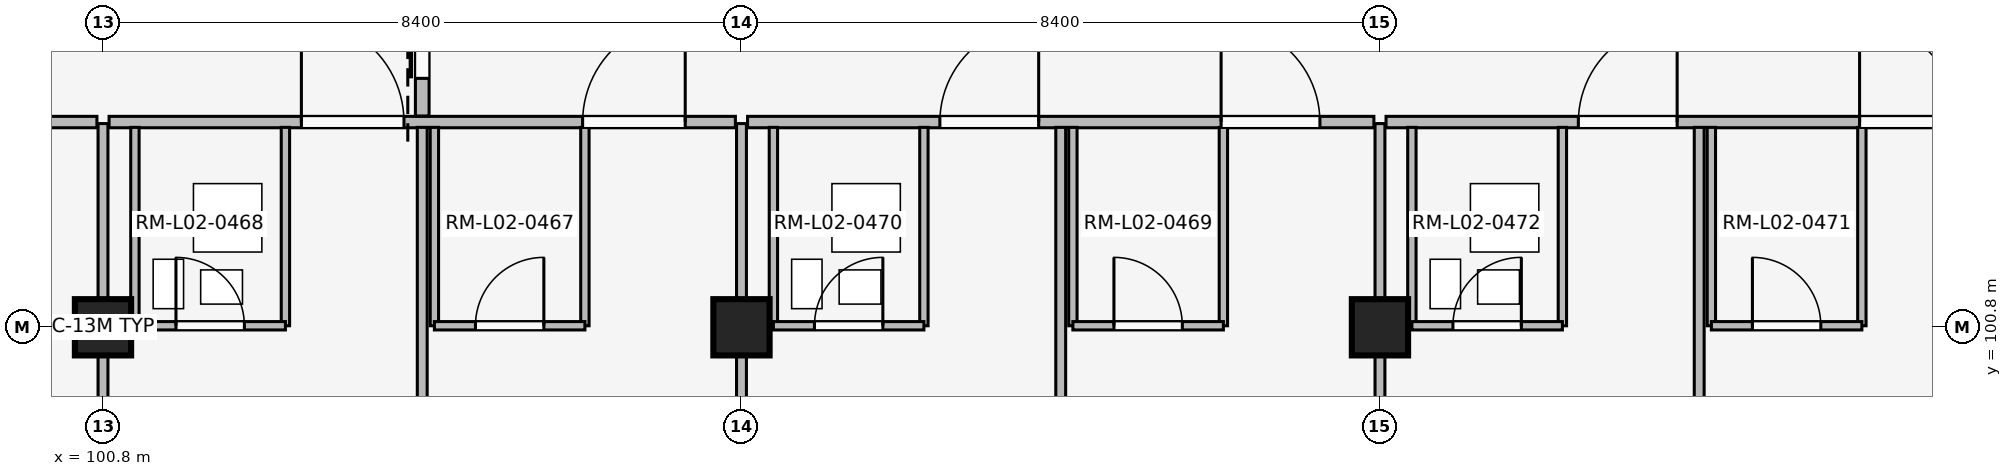
"""IFC4 building model, lengths in metres.
Left out: names, types, materials, properties, quantities, classifications, styles, units other than length and angle.
Written with IfcOpenShell. Run it as: python <this file> out.ifc"""

import sys

from ifc_helpers import new_model, si_unit, direction, frame, frame_2d, origin, origin_2d, place, context, subcontext, project, spatial, rectangle, extrude, element, fill, save


model = new_model("IFC4")
c1 = context("Model", 3, precision=1e-05, world=origin(), true_north=direction((0.0, 1.0)))
c2 = subcontext(c1, "Body", "Model", "MODEL_VIEW")
j1 = project(units=[si_unit("LENGTHUNIT", "METRE"), si_unit("PLANEANGLEUNIT", "RADIAN")], contexts=[c1])
p1 = place(None, origin())
s1 = spatial("IfcSite", under=j1, at=p1, CompositionType="ELEMENT")
p2 = place(p1, origin())
s2 = spatial("IfcBuilding", under=s1, at=p2, CompositionType="ELEMENT")
p3 = place(p2, frame((0.0, 0.0, 8.1)))
s3 = spatial("IfcBuildingStorey", under=s2, at=p3, CompositionType="ELEMENT", Elevation=8.1)
for number, where, z_axis, x_axis in (
    (1, (100.8, 100.8, 0.0), (0.0, 0.0, 1.0), (1.0, 0.0, 0.0)),
    (2, (109.2, 100.8, 0.0), (0.0, 0.0, 1.0), (1.0, 0.0, 0.0)),
    (3, (117.6, 100.8, 0.0), (0.0, 0.0, 1.0), (1.0, 0.0, 0.0)),
):
    element("IfcColumn", number, at=place(p3, frame(where, z_axis=z_axis, x_axis=x_axis)), inside=s3, PredefinedType="COLUMN", context=c2, shape_type="SweptSolid", body=[
        extrude(rectangle(XDim=0.74, YDim=0.74, at=origin_2d()), origin(), (0.0, 0.0, 1.0), 4.8),
    ])
p4 = place(p3, frame((92.76, 103.5, 0.0), z_axis=(0.0, 0.0, 1.0), x_axis=(1.0, 0.0, 0.0)))
e4 = element("IfcWall", 4, at=p4, inside=s3, PredefinedType="PARTITIONING", context=c2, shape_type="SweptSolid", body=[
    extrude(rectangle(XDim=7.96, YDim=0.15, at=frame_2d((3.98, 0.0))), origin(), (0.0, 0.0, 1.0), 3.84),
])
p5 = place(p4, frame((2.25, 0.0, 0.0)))
e5 = element("IfcOpeningElement", 5, at=p5, cuts=e4, PredefinedType="OPENING", context=c2, shape_type="SweptSolid", body=[
    extrude(rectangle(XDim=1.3, YDim=2.25, at=frame_2d((0.65, 1.125))), frame((0.0, 0.085, 0.0), z_axis=(0.0, -1.0, 0.0), x_axis=(1.0, 0.0, 0.0)), (0.0, 0.0, 1.0), 0.17),
])
p6 = place(p4, frame((5.95, 0.0, 0.0)))
e6 = element("IfcOpeningElement", 6, at=p6, cuts=e4, PredefinedType="OPENING", context=c2, shape_type="SweptSolid", body=[
    extrude(rectangle(XDim=1.3, YDim=2.25, at=frame_2d((0.65, 1.125))), frame((0.0, 0.085, 0.0), z_axis=(0.0, -1.0, 0.0), x_axis=(1.0, 0.0, 0.0)), (0.0, 0.0, 1.0), 0.17),
])
p7 = place(p3, frame((100.8, 92.54, 0.0), z_axis=(0.0, 0.0, 1.0), x_axis=(0.0, 1.0, 0.0)))
e7 = element("IfcWall", 7, at=p7, inside=s3, PredefinedType="PARTITIONING", context=c2, shape_type="SweptSolid", body=[
    extrude(rectangle(XDim=10.94, YDim=0.13, at=frame_2d((5.47, 0.0))), origin(), (0.0, 0.0, 1.0), 3.84),
])
p8 = place(p3, frame((100.88, 103.5, 0.0), z_axis=(0.0, 0.0, 1.0), x_axis=(1.0, 0.0, 0.0)))
e8 = element("IfcWall", 8, at=p8, inside=s3, PredefinedType="PARTITIONING", context=c2, shape_type="SweptSolid", body=[
    extrude(rectangle(XDim=8.24, YDim=0.15, at=frame_2d((4.12, 0.0))), origin(), (0.0, 0.0, 1.0), 3.84),
])
p9 = place(p8, frame((2.53, 0.0, 0.0)))
e9 = element("IfcOpeningElement", 9, at=p9, cuts=e8, PredefinedType="OPENING", context=c2, shape_type="SweptSolid", body=[
    extrude(rectangle(XDim=1.35, YDim=2.25, at=frame_2d((0.675, 1.125))), frame((0.0, 0.085, 0.0), z_axis=(0.0, -1.0, 0.0), x_axis=(1.0, 0.0, 0.0)), (0.0, 0.0, 1.0), 0.17),
])
p10 = place(p8, frame((6.23, 0.0, 0.0)))
e10 = element("IfcOpeningElement", 10, at=p10, cuts=e8, PredefinedType="OPENING", context=c2, shape_type="SweptSolid", body=[
    extrude(rectangle(XDim=1.35, YDim=2.25, at=frame_2d((0.675, 1.125))), frame((0.0, 0.085, 0.0), z_axis=(0.0, -1.0, 0.0), x_axis=(1.0, 0.0, 0.0)), (0.0, 0.0, 1.0), 0.17),
])
p11 = place(p3, frame((105.0, 92.5, 0.0), z_axis=(0.0, 0.0, 1.0), x_axis=(0.0, 1.0, 0.0)))
e11 = element("IfcWall", 11, at=p11, inside=s3, PredefinedType="PARTITIONING", context=c2, shape_type="SweptSolid", body=[
    extrude(rectangle(XDim=10.93, YDim=0.13, at=frame_2d((5.465, 0.0))), origin(), (0.0, 0.0, 1.0), 3.84),
])
for number, where, z_axis, x_axis in (
    (12, (101.22, 100.82, 0.0), (0.0, 0.0, 1.0), (0.0, 1.0, 0.0)),
    (13, (103.2, 100.82, 0.0), (0.0, 0.0, 1.0), (0.0, 1.0, 0.0)),
):
    element("IfcWall", number, at=place(p3, frame(where, z_axis=z_axis, x_axis=x_axis)), inside=s3, PredefinedType="PARTITIONING", context=c2, shape_type="SweptSolid", body=[
        extrude(rectangle(XDim=2.61, YDim=0.11, at=frame_2d((1.305, 0.0))), origin(), (0.0, 0.0, 1.0), 3.84),
    ])
p12 = place(p3, frame((101.22, 100.82, 0.0), z_axis=(0.0, 0.0, 1.0), x_axis=(1.0, 0.0, 0.0)))
e14 = element("IfcWall", 14, at=p12, inside=s3, PredefinedType="PARTITIONING", context=c2, shape_type="SweptSolid", body=[
    extrude(rectangle(XDim=1.98, YDim=0.11, at=frame_2d((0.99, 0.0))), origin(), (0.0, 0.0, 1.0), 3.84),
])
p13 = place(p12, frame((0.54, 0.0, 0.0)))
e15 = element("IfcOpeningElement", 15, at=p13, cuts=e14, PredefinedType="OPENING", context=c2, shape_type="SweptSolid", body=[
    extrude(rectangle(XDim=0.9, YDim=2.1, at=frame_2d((0.45, 1.05))), frame((0.0, 0.065, 0.0), z_axis=(0.0, -1.0, 0.0), x_axis=(1.0, 0.0, 0.0)), (0.0, 0.0, 1.0), 0.13),
])
for number, where, z_axis, x_axis in (
    (16, (105.16, 100.82, 0.0), (0.0, 0.0, 1.0), (0.0, 1.0, 0.0)),
    (17, (107.14, 100.82, 0.0), (0.0, 0.0, 1.0), (0.0, 1.0, 0.0)),
):
    element("IfcWall", number, at=place(p3, frame(where, z_axis=z_axis, x_axis=x_axis)), inside=s3, PredefinedType="PARTITIONING", context=c2, shape_type="SweptSolid", body=[
        extrude(rectangle(XDim=2.61, YDim=0.11, at=frame_2d((1.305, 0.0))), origin(), (0.0, 0.0, 1.0), 3.84),
    ])
p14 = place(p3, frame((105.16, 100.82, 0.0), z_axis=(0.0, 0.0, 1.0), x_axis=(1.0, 0.0, 0.0)))
e18 = element("IfcWall", 18, at=p14, inside=s3, PredefinedType="PARTITIONING", context=c2, shape_type="SweptSolid", body=[
    extrude(rectangle(XDim=1.98, YDim=0.11, at=frame_2d((0.99, 0.0))), origin(), (0.0, 0.0, 1.0), 3.84),
])
p15 = place(p14, frame((0.54, 0.0, 0.0)))
e19 = element("IfcOpeningElement", 19, at=p15, cuts=e18, PredefinedType="OPENING", context=c2, shape_type="SweptSolid", body=[
    extrude(rectangle(XDim=0.9, YDim=2.1, at=frame_2d((0.45, 1.05))), frame((0.0, 0.065, 0.0), z_axis=(0.0, -1.0, 0.0), x_axis=(1.0, 0.0, 0.0)), (0.0, 0.0, 1.0), 0.13),
])
p16 = place(p3, frame((105.0, 103.58, 0.0), z_axis=(0.0, 0.0, 1.0), x_axis=(0.0, 1.0, 0.0)))
e20 = element("IfcWall", 20, at=p16, inside=s3, PredefinedType="PARTITIONING", context=c2, shape_type="SweptSolid", body=[
    extrude(rectangle(XDim=2.84, YDim=0.18, at=frame_2d((1.42, 0.0))), origin(), (0.0, 0.0, 1.0), 3.84),
])
p17 = place(p16, frame((0.495, 0.0, 0.0)))
e21 = element("IfcOpeningElement", 21, at=p17, cuts=e20, PredefinedType="OPENING", context=c2, shape_type="SweptSolid", body=[
    extrude(rectangle(XDim=1.85, YDim=2.3, at=frame_2d((0.925, 1.15))), frame((0.0, 0.1, 0.0), z_axis=(0.0, -1.0, 0.0), x_axis=(1.0, 0.0, 0.0)), (0.0, 0.0, 1.0), 0.2),
])
p18 = place(p3, frame((109.2, 92.54, 0.0), z_axis=(0.0, 0.0, 1.0), x_axis=(0.0, 1.0, 0.0)))
e22 = element("IfcWall", 22, at=p18, inside=s3, PredefinedType="PARTITIONING", context=c2, shape_type="SweptSolid", body=[
    extrude(rectangle(XDim=10.94, YDim=0.13, at=frame_2d((5.47, 0.0))), origin(), (0.0, 0.0, 1.0), 3.84),
])
p19 = place(p3, frame((109.28, 103.5, 0.0), z_axis=(0.0, 0.0, 1.0), x_axis=(1.0, 0.0, 0.0)))
e23 = element("IfcWall", 23, at=p19, inside=s3, PredefinedType="PARTITIONING", context=c2, shape_type="SweptSolid", body=[
    extrude(rectangle(XDim=8.24, YDim=0.15, at=frame_2d((4.12, 0.0))), origin(), (0.0, 0.0, 1.0), 3.84),
])
p20 = place(p19, frame((2.53, 0.0, 0.0)))
e24 = element("IfcOpeningElement", 24, at=p20, cuts=e23, PredefinedType="OPENING", context=c2, shape_type="SweptSolid", body=[
    extrude(rectangle(XDim=1.3, YDim=2.25, at=frame_2d((0.65, 1.125))), frame((0.0, 0.085, 0.0), z_axis=(0.0, -1.0, 0.0), x_axis=(1.0, 0.0, 0.0)), (0.0, 0.0, 1.0), 0.17),
])
p21 = place(p19, frame((6.23, 0.0, 0.0)))
e25 = element("IfcOpeningElement", 25, at=p21, cuts=e23, PredefinedType="OPENING", context=c2, shape_type="SweptSolid", body=[
    extrude(rectangle(XDim=1.3, YDim=2.25, at=frame_2d((0.65, 1.125))), frame((0.0, 0.085, 0.0), z_axis=(0.0, -1.0, 0.0), x_axis=(1.0, 0.0, 0.0)), (0.0, 0.0, 1.0), 0.17),
])
p22 = place(p3, frame((113.4, 92.5, 0.0), z_axis=(0.0, 0.0, 1.0), x_axis=(0.0, 1.0, 0.0)))
e26 = element("IfcWall", 26, at=p22, inside=s3, PredefinedType="PARTITIONING", context=c2, shape_type="SweptSolid", body=[
    extrude(rectangle(XDim=10.93, YDim=0.13, at=frame_2d((5.465, 0.0))), origin(), (0.0, 0.0, 1.0), 3.84),
])
for number, where, z_axis, x_axis in (
    (27, (109.62, 100.82, 0.0), (0.0, 0.0, 1.0), (0.0, 1.0, 0.0)),
    (28, (111.6, 100.82, 0.0), (0.0, 0.0, 1.0), (0.0, 1.0, 0.0)),
):
    element("IfcWall", number, at=place(p3, frame(where, z_axis=z_axis, x_axis=x_axis)), inside=s3, PredefinedType="PARTITIONING", context=c2, shape_type="SweptSolid", body=[
        extrude(rectangle(XDim=2.61, YDim=0.11, at=frame_2d((1.305, 0.0))), origin(), (0.0, 0.0, 1.0), 3.84),
    ])
p23 = place(p3, frame((109.62, 100.82, 0.0), z_axis=(0.0, 0.0, 1.0), x_axis=(1.0, 0.0, 0.0)))
e29 = element("IfcWall", 29, at=p23, inside=s3, PredefinedType="PARTITIONING", context=c2, shape_type="SweptSolid", body=[
    extrude(rectangle(XDim=1.98, YDim=0.11, at=frame_2d((0.99, 0.0))), origin(), (0.0, 0.0, 1.0), 3.84),
])
p24 = place(p23, frame((0.54, 0.0, 0.0)))
e30 = element("IfcOpeningElement", 30, at=p24, cuts=e29, PredefinedType="OPENING", context=c2, shape_type="SweptSolid", body=[
    extrude(rectangle(XDim=0.9, YDim=2.1, at=frame_2d((0.45, 1.05))), frame((0.0, 0.065, 0.0), z_axis=(0.0, -1.0, 0.0), x_axis=(1.0, 0.0, 0.0)), (0.0, 0.0, 1.0), 0.13),
])
for number, where, z_axis, x_axis in (
    (31, (113.56, 100.82, 0.0), (0.0, 0.0, 1.0), (0.0, 1.0, 0.0)),
    (32, (115.54, 100.82, 0.0), (0.0, 0.0, 1.0), (0.0, 1.0, 0.0)),
):
    element("IfcWall", number, at=place(p3, frame(where, z_axis=z_axis, x_axis=x_axis)), inside=s3, PredefinedType="PARTITIONING", context=c2, shape_type="SweptSolid", body=[
        extrude(rectangle(XDim=2.61, YDim=0.11, at=frame_2d((1.305, 0.0))), origin(), (0.0, 0.0, 1.0), 3.84),
    ])
p25 = place(p3, frame((113.56, 100.82, 0.0), z_axis=(0.0, 0.0, 1.0), x_axis=(1.0, 0.0, 0.0)))
e33 = element("IfcWall", 33, at=p25, inside=s3, PredefinedType="PARTITIONING", context=c2, shape_type="SweptSolid", body=[
    extrude(rectangle(XDim=1.98, YDim=0.11, at=frame_2d((0.99, 0.0))), origin(), (0.0, 0.0, 1.0), 3.84),
])
p26 = place(p25, frame((0.54, 0.0, 0.0)))
e34 = element("IfcOpeningElement", 34, at=p26, cuts=e33, PredefinedType="OPENING", context=c2, shape_type="SweptSolid", body=[
    extrude(rectangle(XDim=0.9, YDim=2.1, at=frame_2d((0.45, 1.05))), frame((0.0, 0.065, 0.0), z_axis=(0.0, -1.0, 0.0), x_axis=(1.0, 0.0, 0.0)), (0.0, 0.0, 1.0), 0.13),
])
p27 = place(p3, frame((117.6, 92.54, 0.0), z_axis=(0.0, 0.0, 1.0), x_axis=(0.0, 1.0, 0.0)))
e35 = element("IfcWall", 35, at=p27, inside=s3, PredefinedType="PARTITIONING", context=c2, shape_type="SweptSolid", body=[
    extrude(rectangle(XDim=10.94, YDim=0.13, at=frame_2d((5.47, 0.0))), origin(), (0.0, 0.0, 1.0), 3.84),
])
p28 = place(p3, frame((117.68, 103.5, 0.0), z_axis=(0.0, 0.0, 1.0), x_axis=(1.0, 0.0, 0.0)))
e36 = element("IfcWall", 36, at=p28, inside=s3, PredefinedType="PARTITIONING", context=c2, shape_type="SweptSolid", body=[
    extrude(rectangle(XDim=8.24, YDim=0.15, at=frame_2d((4.12, 0.0))), origin(), (0.0, 0.0, 1.0), 3.84),
])
p29 = place(p28, frame((2.53, 0.0, 0.0)))
e37 = element("IfcOpeningElement", 37, at=p29, cuts=e36, PredefinedType="OPENING", context=c2, shape_type="SweptSolid", body=[
    extrude(rectangle(XDim=1.3, YDim=2.25, at=frame_2d((0.65, 1.125))), frame((0.0, 0.085, 0.0), z_axis=(0.0, -1.0, 0.0), x_axis=(1.0, 0.0, 0.0)), (0.0, 0.0, 1.0), 0.17),
])
p30 = place(p28, frame((6.23, 0.0, 0.0)))
e38 = element("IfcOpeningElement", 38, at=p30, cuts=e36, PredefinedType="OPENING", context=c2, shape_type="SweptSolid", body=[
    extrude(rectangle(XDim=1.3, YDim=2.25, at=frame_2d((0.65, 1.125))), frame((0.0, 0.085, 0.0), z_axis=(0.0, -1.0, 0.0), x_axis=(1.0, 0.0, 0.0)), (0.0, 0.0, 1.0), 0.17),
])
p31 = place(p3, frame((121.8, 92.5, 0.0), z_axis=(0.0, 0.0, 1.0), x_axis=(0.0, 1.0, 0.0)))
e39 = element("IfcWall", 39, at=p31, inside=s3, PredefinedType="PARTITIONING", context=c2, shape_type="SweptSolid", body=[
    extrude(rectangle(XDim=10.93, YDim=0.13, at=frame_2d((5.465, 0.0))), origin(), (0.0, 0.0, 1.0), 3.84),
])
for number, where, z_axis, x_axis in (
    (40, (118.02, 100.82, 0.0), (0.0, 0.0, 1.0), (0.0, 1.0, 0.0)),
    (41, (120.0, 100.82, 0.0), (0.0, 0.0, 1.0), (0.0, 1.0, 0.0)),
):
    element("IfcWall", number, at=place(p3, frame(where, z_axis=z_axis, x_axis=x_axis)), inside=s3, PredefinedType="PARTITIONING", context=c2, shape_type="SweptSolid", body=[
        extrude(rectangle(XDim=2.61, YDim=0.11, at=frame_2d((1.305, 0.0))), origin(), (0.0, 0.0, 1.0), 3.84),
    ])
p32 = place(p3, frame((118.02, 100.82, 0.0), z_axis=(0.0, 0.0, 1.0), x_axis=(1.0, 0.0, 0.0)))
e42 = element("IfcWall", 42, at=p32, inside=s3, PredefinedType="PARTITIONING", context=c2, shape_type="SweptSolid", body=[
    extrude(rectangle(XDim=1.98, YDim=0.11, at=frame_2d((0.99, 0.0))), origin(), (0.0, 0.0, 1.0), 3.84),
])
p33 = place(p32, frame((0.54, 0.0, 0.0)))
e43 = element("IfcOpeningElement", 43, at=p33, cuts=e42, PredefinedType="OPENING", context=c2, shape_type="SweptSolid", body=[
    extrude(rectangle(XDim=0.9, YDim=2.1, at=frame_2d((0.45, 1.05))), frame((0.0, 0.065, 0.0), z_axis=(0.0, -1.0, 0.0), x_axis=(1.0, 0.0, 0.0)), (0.0, 0.0, 1.0), 0.13),
])
for number, where, z_axis, x_axis in (
    (44, (121.96, 100.82, 0.0), (0.0, 0.0, 1.0), (0.0, 1.0, 0.0)),
    (45, (123.94, 100.82, 0.0), (0.0, 0.0, 1.0), (0.0, 1.0, 0.0)),
):
    element("IfcWall", number, at=place(p3, frame(where, z_axis=z_axis, x_axis=x_axis)), inside=s3, PredefinedType="PARTITIONING", context=c2, shape_type="SweptSolid", body=[
        extrude(rectangle(XDim=2.61, YDim=0.11, at=frame_2d((1.305, 0.0))), origin(), (0.0, 0.0, 1.0), 3.84),
    ])
p34 = place(p3, frame((121.96, 100.82, 0.0), z_axis=(0.0, 0.0, 1.0), x_axis=(1.0, 0.0, 0.0)))
e46 = element("IfcWall", 46, at=p34, inside=s3, PredefinedType="PARTITIONING", context=c2, shape_type="SweptSolid", body=[
    extrude(rectangle(XDim=1.98, YDim=0.11, at=frame_2d((0.99, 0.0))), origin(), (0.0, 0.0, 1.0), 3.84),
])
p35 = place(p34, frame((0.54, 0.0, 0.0)))
e47 = element("IfcOpeningElement", 47, at=p35, cuts=e46, PredefinedType="OPENING", context=c2, shape_type="SweptSolid", body=[
    extrude(rectangle(XDim=0.9, YDim=2.1, at=frame_2d((0.45, 1.05))), frame((0.0, 0.065, 0.0), z_axis=(0.0, -1.0, 0.0), x_axis=(1.0, 0.0, 0.0)), (0.0, 0.0, 1.0), 0.13),
])
p36 = place(p9, origin())
e48 = element("IfcDoor", 48, at=p36, inside=s3, OperationType="SINGLE_SWING_LEFT", PredefinedType="DOOR", context=c2, shape_type="SweptSolid", body=[
    extrude(rectangle(XDim=1.35, YDim=2.25, at=frame_2d((0.675, 1.125))), frame((0.0, 0.025, 0.0), z_axis=(0.0, -1.0, 0.0), x_axis=(1.0, 0.0, 0.0)), (0.0, 0.0, 1.0), 0.05),
])
fill(e9, e48)
p37 = place(p10, origin())
e49 = element("IfcDoor", 49, at=p37, inside=s3, OperationType="SINGLE_SWING_RIGHT", PredefinedType="DOOR", context=c2, shape_type="SweptSolid", body=[
    extrude(rectangle(XDim=1.35, YDim=2.25, at=frame_2d((0.675, 1.125))), frame((0.0, 0.025, 0.0), z_axis=(0.0, -1.0, 0.0), x_axis=(1.0, 0.0, 0.0)), (0.0, 0.0, 1.0), 0.05),
])
fill(e10, e49)
p38 = place(p13, origin())
e50 = element("IfcDoor", 50, at=p38, inside=s3, OperationType="SINGLE_SWING_LEFT", PredefinedType="DOOR", context=c2, shape_type="SweptSolid", body=[
    extrude(rectangle(XDim=0.9, YDim=2.1, at=frame_2d((0.45, 1.05))), frame((0.0, 0.025, 0.0), z_axis=(0.0, -1.0, 0.0), x_axis=(1.0, 0.0, 0.0)), (0.0, 0.0, 1.0), 0.05),
])
fill(e15, e50)
p39 = place(p15, origin())
e51 = element("IfcDoor", 51, at=p39, inside=s3, OperationType="SINGLE_SWING_RIGHT", PredefinedType="DOOR", context=c2, shape_type="SweptSolid", body=[
    extrude(rectangle(XDim=0.9, YDim=2.1, at=frame_2d((0.45, 1.05))), frame((0.0, 0.025, 0.0), z_axis=(0.0, -1.0, 0.0), x_axis=(1.0, 0.0, 0.0)), (0.0, 0.0, 1.0), 0.05),
])
fill(e19, e51)
p40 = place(p17, origin())
e52 = element("IfcDoor", 52, at=p40, inside=s3, OperationType="SLIDING_TO_LEFT", PredefinedType="DOOR", context=c2, shape_type="SweptSolid", body=[
    extrude(rectangle(XDim=1.85, YDim=2.3, at=frame_2d((0.925, 1.15))), frame((0.0, 0.025, 0.0), z_axis=(0.0, -1.0, 0.0), x_axis=(1.0, 0.0, 0.0)), (0.0, 0.0, 1.0), 0.05),
])
fill(e21, e52)
p41 = place(p20, origin())
e53 = element("IfcDoor", 53, at=p41, inside=s3, OperationType="SINGLE_SWING_RIGHT", PredefinedType="DOOR", context=c2, shape_type="SweptSolid", body=[
    extrude(rectangle(XDim=1.3, YDim=2.25, at=frame_2d((0.65, 1.125))), frame((0.0, 0.025, 0.0), z_axis=(0.0, -1.0, 0.0), x_axis=(1.0, 0.0, 0.0)), (0.0, 0.0, 1.0), 0.05),
])
fill(e24, e53)
p42 = place(p21, origin())
e54 = element("IfcDoor", 54, at=p42, inside=s3, OperationType="SINGLE_SWING_LEFT", PredefinedType="DOOR", context=c2, shape_type="SweptSolid", body=[
    extrude(rectangle(XDim=1.3, YDim=2.25, at=frame_2d((0.65, 1.125))), frame((0.0, 0.025, 0.0), z_axis=(0.0, -1.0, 0.0), x_axis=(1.0, 0.0, 0.0)), (0.0, 0.0, 1.0), 0.05),
])
fill(e25, e54)
p43 = place(p24, origin())
e55 = element("IfcDoor", 55, at=p43, inside=s3, OperationType="SINGLE_SWING_RIGHT", PredefinedType="DOOR", context=c2, shape_type="SweptSolid", body=[
    extrude(rectangle(XDim=0.9, YDim=2.1, at=frame_2d((0.45, 1.05))), frame((0.0, 0.025, 0.0), z_axis=(0.0, -1.0, 0.0), x_axis=(1.0, 0.0, 0.0)), (0.0, 0.0, 1.0), 0.05),
])
fill(e30, e55)
p44 = place(p26, origin())
e56 = element("IfcDoor", 56, at=p44, inside=s3, OperationType="SINGLE_SWING_LEFT", PredefinedType="DOOR", context=c2, shape_type="SweptSolid", body=[
    extrude(rectangle(XDim=0.9, YDim=2.1, at=frame_2d((0.45, 1.05))), frame((0.0, 0.025, 0.0), z_axis=(0.0, -1.0, 0.0), x_axis=(1.0, 0.0, 0.0)), (0.0, 0.0, 1.0), 0.05),
])
fill(e34, e56)
p45 = place(p29, origin())
e57 = element("IfcDoor", 57, at=p45, inside=s3, OperationType="SINGLE_SWING_RIGHT", PredefinedType="DOOR", context=c2, shape_type="SweptSolid", body=[
    extrude(rectangle(XDim=1.3, YDim=2.25, at=frame_2d((0.65, 1.125))), frame((0.0, 0.025, 0.0), z_axis=(0.0, -1.0, 0.0), x_axis=(1.0, 0.0, 0.0)), (0.0, 0.0, 1.0), 0.05),
])
fill(e37, e57)
p46 = place(p30, origin())
e58 = element("IfcDoor", 58, at=p46, inside=s3, OperationType="SINGLE_SWING_LEFT", PredefinedType="DOOR", context=c2, shape_type="SweptSolid", body=[
    extrude(rectangle(XDim=1.3, YDim=2.25, at=frame_2d((0.65, 1.125))), frame((0.0, 0.025, 0.0), z_axis=(0.0, -1.0, 0.0), x_axis=(1.0, 0.0, 0.0)), (0.0, 0.0, 1.0), 0.05),
])
fill(e38, e58)
p47 = place(p33, origin())
e59 = element("IfcDoor", 59, at=p47, inside=s3, OperationType="SINGLE_SWING_RIGHT", PredefinedType="DOOR", context=c2, shape_type="SweptSolid", body=[
    extrude(rectangle(XDim=0.9, YDim=2.1, at=frame_2d((0.45, 1.05))), frame((0.0, 0.025, 0.0), z_axis=(0.0, -1.0, 0.0), x_axis=(1.0, 0.0, 0.0)), (0.0, 0.0, 1.0), 0.05),
])
fill(e43, e59)
p48 = place(p35, origin())
e60 = element("IfcDoor", 60, at=p48, inside=s3, OperationType="SINGLE_SWING_LEFT", PredefinedType="DOOR", context=c2, shape_type="SweptSolid", body=[
    extrude(rectangle(XDim=0.9, YDim=2.1, at=frame_2d((0.45, 1.05))), frame((0.0, 0.025, 0.0), z_axis=(0.0, -1.0, 0.0), x_axis=(1.0, 0.0, 0.0)), (0.0, 0.0, 1.0), 0.05),
])
fill(e47, e60)
save(model, sys.argv[1])
